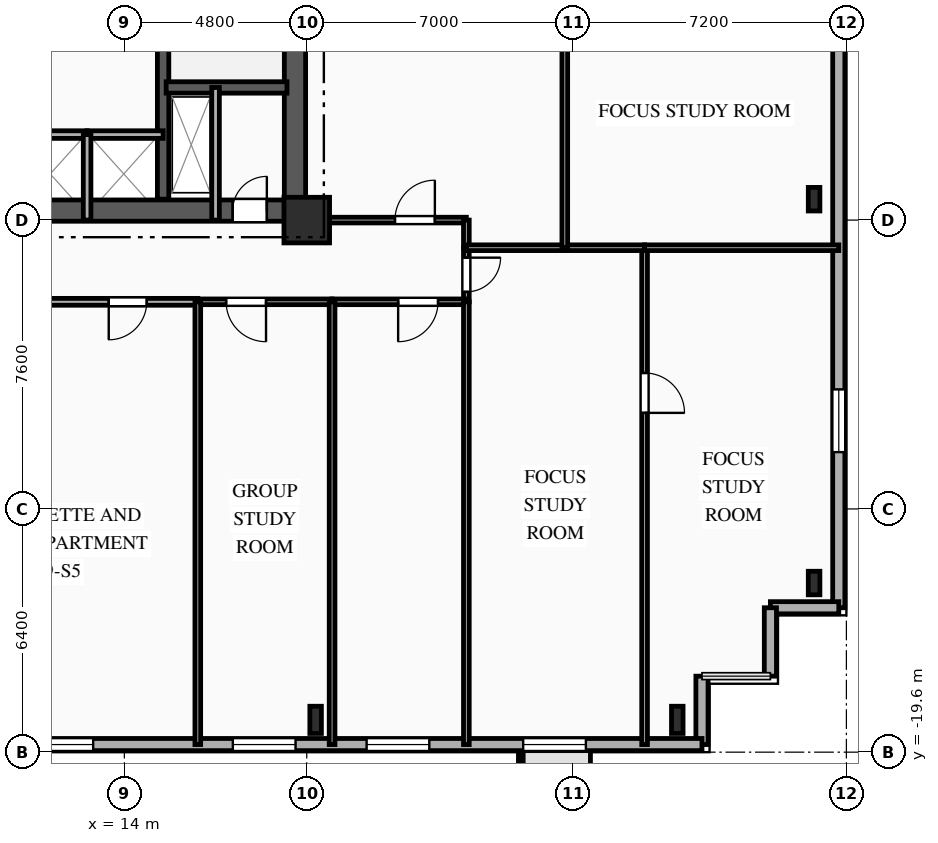
"""IFC4 building model, lengths in metres.
Left out: names, types, materials, properties, quantities, classifications, styles, units other than length and angle.
Written with IfcOpenShell. Run it as: python <this file> out.ifc"""

import sys

from ifc_helpers import new_model, si_unit, direction, frame, frame_2d, origin, origin_2d, place, context, subcontext, project, spatial, rectangle, i_section, extrude, element, fill, save


model = new_model("IFC4")
c1 = context("Model", 3, precision=1e-05, world=origin(), true_north=direction((0.0, 1.0)))
c2 = subcontext(c1, "Body", "Model", "MODEL_VIEW")
j1 = project(units=[si_unit("LENGTHUNIT", "METRE"), si_unit("PLANEANGLEUNIT", "RADIAN")], contexts=[c1])
p1 = place(None, origin())
s1 = spatial("IfcSite", under=j1, at=p1, CompositionType="ELEMENT")
p2 = place(p1, origin())
s2 = spatial("IfcBuilding", under=s1, at=p2, CompositionType="ELEMENT")
p3 = place(p2, frame((0.0, 0.0, 37.05)))
s3 = spatial("IfcBuildingStorey", under=s2, at=p3, CompositionType="ELEMENT", Elevation=37.05)
p4 = place(p3, frame((18.8, -5.6, 0.0), z_axis=(0.0, 0.0, 1.0), x_axis=(1.0, 0.0, 0.0)))
e1 = element("IfcColumn", 1, at=p4, inside=s3, PredefinedType="COLUMN", context=c2, shape_type="SweptSolid", body=[
    extrude(rectangle(XDim=1.2, YDim=1.2, at=origin_2d()), origin(), (0.0, 0.0, 1.0), 3.35),
])
for number, where, z_axis, x_axis in (
    (2, (19.033, -18.75, 0.0), (0.0, 0.0, 1.0), (1.0, 0.0, 0.0)),
    (3, (28.55, -18.75, 0.0), (0.0, 0.0, 1.0), (1.0, 0.0, 0.0)),
):
    element("IfcColumn", number, at=place(p3, frame(where, z_axis=z_axis, x_axis=x_axis)), inside=s3, PredefinedType="COLUMN", context=c2, shape_type="SweptSolid", body=[
        extrude(i_section(OverallWidth=0.304, OverallDepth=0.716, WebThickness=0.021, FlangeThickness=0.04, FilletRadius=0.027, at=origin_2d()), origin(), (0.0, 0.0, 1.0), 3.35),
    ])
for number, where, z_axis, x_axis in (
    (4, (32.15, -15.15, 0.0), (0.0, 0.0, 1.0), (1.0, 0.0, 0.0)),
    (5, (32.15, -5.05, 0.0), (0.0, 0.0, 1.0), (1.0, 0.0, 0.0)),
):
    element("IfcColumn", number, at=place(p3, frame(where, z_axis=z_axis, x_axis=x_axis)), inside=s3, PredefinedType="COLUMN", context=c2, shape_type="SweptSolid", body=[
        extrude(i_section(OverallWidth=0.305, OverallDepth=0.62, WebThickness=0.021, FlangeThickness=0.04, FilletRadius=0.027, at=origin_2d()), origin(), (0.0, 0.0, 1.0), 3.35),
    ])
p5 = place(p3, frame((32.8, 15.8, 0.0), z_axis=(0.0, 0.0, 1.0), x_axis=(0.0, -1.0, 0.0)))
e6 = element("IfcWall", 6, at=p5, inside=s3, PredefinedType="SOLIDWALL", context=c2, shape_type="SweptSolid", body=[
    extrude(rectangle(XDim=31.6, YDim=0.32, at=frame_2d((15.8, 0.0))), origin(), (0.0, 0.0, 1.0), 3.035),
])
p6 = place(p5, frame((4.175, 0.0, 0.85)))
e7 = element("IfcOpeningElement", 7, at=p6, cuts=e6, PredefinedType="OPENING", context=c2, shape_type="SweptSolid", body=[
    extrude(rectangle(XDim=1.65, YDim=1.85, at=frame_2d((0.825, 0.925))), frame((0.0, 0.17, 0.0), z_axis=(0.0, -1.0, 0.0), x_axis=(1.0, 0.0, 0.0)), (0.0, 0.0, 1.0), 0.34),
])
p7 = place(p5, frame((15.015, 0.0, 0.85)))
e8 = element("IfcOpeningElement", 8, at=p7, cuts=e6, PredefinedType="OPENING", context=c2, shape_type="SweptSolid", body=[
    extrude(rectangle(XDim=1.65, YDim=1.85, at=frame_2d((0.825, 0.925))), frame((0.0, 0.17, 0.0), z_axis=(0.0, -1.0, 0.0), x_axis=(1.0, 0.0, 0.0)), (0.0, 0.0, 1.0), 0.34),
])
p8 = place(p5, frame((25.855, 0.0, 0.85)))
e9 = element("IfcOpeningElement", 9, at=p8, cuts=e6, PredefinedType="OPENING", context=c2, shape_type="SweptSolid", body=[
    extrude(rectangle(XDim=1.65, YDim=1.85, at=frame_2d((0.825, 0.925))), frame((0.0, 0.17, 0.0), z_axis=(0.0, -1.0, 0.0), x_axis=(1.0, 0.0, 0.0)), (0.0, 0.0, 1.0), 0.34),
])
for number, where, z_axis, x_axis in (
    (10, (32.8, -15.8, 0.0), (0.0, 0.0, 1.0), (-1.0, 0.0, 0.0)),
    (11, (31.0, -15.8, 0.0), (0.0, 0.0, 1.0), (0.0, -1.0, 0.0)),
):
    element("IfcWall", number, at=place(p3, frame(where, z_axis=z_axis, x_axis=x_axis)), inside=s3, PredefinedType="SOLIDWALL", context=c2, shape_type="SweptSolid", body=[
        extrude(rectangle(XDim=1.8, YDim=0.32, at=frame_2d((0.9, 0.0))), origin(), (0.0, 0.0, 1.0), 3.035),
    ])
p9 = place(p3, frame((29.2, -17.6, 0.0), z_axis=(0.0, 0.0, 1.0), x_axis=(0.0, -1.0, 0.0)))
e12 = element("IfcWall", 12, at=p9, inside=s3, PredefinedType="SOLIDWALL", context=c2, shape_type="SweptSolid", body=[
    extrude(rectangle(XDim=1.8, YDim=0.32, at=frame_2d((0.9, 0.0))), origin(), (0.0, 0.0, 1.0), 3.035),
])
p10 = place(p3, frame((29.2, -19.4, 0.0), z_axis=(0.0, 0.0, 1.0), x_axis=(-1.0, 0.0, 0.0)))
e13 = element("IfcWall", 13, at=p10, inside=s3, PredefinedType="SOLIDWALL", context=c2, shape_type="SweptSolid", body=[
    extrude(rectangle(XDim=58.4, YDim=0.32, at=frame_2d((29.2, 0.0))), origin(), (0.0, 0.0, 1.0), 3.035),
])
p11 = place(p10, frame((3.055, 0.0, 0.85)))
e14 = element("IfcOpeningElement", 14, at=p11, cuts=e13, PredefinedType="OPENING", context=c2, shape_type="SweptSolid", body=[
    extrude(rectangle(XDim=1.65, YDim=1.85, at=frame_2d((0.825, 0.925))), frame((0.0, 0.17, 0.0), z_axis=(0.0, -1.0, 0.0), x_axis=(1.0, 0.0, 0.0)), (0.0, 0.0, 1.0), 0.34),
])
p12 = place(p10, frame((7.175, 0.0, 0.85)))
e15 = element("IfcOpeningElement", 15, at=p12, cuts=e13, PredefinedType="OPENING", context=c2, shape_type="SweptSolid", body=[
    extrude(rectangle(XDim=1.65, YDim=1.85, at=frame_2d((0.825, 0.925))), frame((0.0, 0.17, 0.0), z_axis=(0.0, -1.0, 0.0), x_axis=(1.0, 0.0, 0.0)), (0.0, 0.0, 1.0), 0.34),
])
p13 = place(p10, frame((10.695, 0.0, 0.85)))
e16 = element("IfcOpeningElement", 16, at=p13, cuts=e13, PredefinedType="OPENING", context=c2, shape_type="SweptSolid", body=[
    extrude(rectangle(XDim=1.65, YDim=1.85, at=frame_2d((0.825, 0.925))), frame((0.0, 0.17, 0.0), z_axis=(0.0, -1.0, 0.0), x_axis=(1.0, 0.0, 0.0)), (0.0, 0.0, 1.0), 0.34),
])
p14 = place(p10, frame((16.02, 0.0, 0.85)))
e17 = element("IfcOpeningElement", 17, at=p14, cuts=e13, PredefinedType="OPENING", context=c2, shape_type="SweptSolid", body=[
    extrude(rectangle(XDim=2.2, YDim=1.85, at=frame_2d((1.1, 0.925))), frame((0.0, 0.17, 0.0), z_axis=(0.0, -1.0, 0.0), x_axis=(1.0, 0.0, 0.0)), (0.0, 0.0, 1.0), 0.34),
])
p15 = place(p10, frame((23.7, 0.0, 0.85)))
e18 = element("IfcOpeningElement", 18, at=p15, cuts=e13, PredefinedType="OPENING", context=c2, shape_type="SweptSolid", body=[
    extrude(rectangle(XDim=2.2, YDim=1.85, at=frame_2d((1.1, 0.925))), frame((0.0, 0.17, 0.0), z_axis=(0.0, -1.0, 0.0), x_axis=(1.0, 0.0, 0.0)), (0.0, 0.0, 1.0), 0.34),
])
p16 = place(p10, frame((31.38, 0.0, 0.85)))
e19 = element("IfcOpeningElement", 19, at=p16, cuts=e13, PredefinedType="OPENING", context=c2, shape_type="SweptSolid", body=[
    extrude(rectangle(XDim=2.2, YDim=1.85, at=frame_2d((1.1, 0.925))), frame((0.0, 0.17, 0.0), z_axis=(0.0, -1.0, 0.0), x_axis=(1.0, 0.0, 0.0)), (0.0, 0.0, 1.0), 0.34),
])
p17 = place(p10, frame((39.06, 0.0, 0.85)))
e20 = element("IfcOpeningElement", 20, at=p17, cuts=e13, PredefinedType="OPENING", context=c2, shape_type="SweptSolid", body=[
    extrude(rectangle(XDim=2.2, YDim=1.85, at=frame_2d((1.1, 0.925))), frame((0.0, 0.17, 0.0), z_axis=(0.0, -1.0, 0.0), x_axis=(1.0, 0.0, 0.0)), (0.0, 0.0, 1.0), 0.34),
])
p18 = place(p10, frame((45.215, 0.0, 0.85)))
e21 = element("IfcOpeningElement", 21, at=p18, cuts=e13, PredefinedType="OPENING", context=c2, shape_type="SweptSolid", body=[
    extrude(rectangle(XDim=1.65, YDim=1.85, at=frame_2d((0.825, 0.925))), frame((0.0, 0.17, 0.0), z_axis=(0.0, -1.0, 0.0), x_axis=(1.0, 0.0, 0.0)), (0.0, 0.0, 1.0), 0.34),
])
p19 = place(p10, frame((49.335, 0.0, 0.85)))
e22 = element("IfcOpeningElement", 22, at=p19, cuts=e13, PredefinedType="OPENING", context=c2, shape_type="SweptSolid", body=[
    extrude(rectangle(XDim=1.65, YDim=1.85, at=frame_2d((0.825, 0.925))), frame((0.0, 0.17, 0.0), z_axis=(0.0, -1.0, 0.0), x_axis=(1.0, 0.0, 0.0)), (0.0, 0.0, 1.0), 0.34),
])
p20 = place(p3, frame((9.2, -5.35, 0.0), z_axis=(0.0, 0.0, 1.0), x_axis=(1.0, 0.0, 0.0)))
e23 = element("IfcWall", 23, at=p20, inside=s3, PredefinedType="SHEAR", context=c2, shape_type="SweptSolid", body=[
    extrude(rectangle(XDim=9.6, YDim=0.56, at=frame_2d((4.8, 0.0))), origin(), (0.0, 0.0, 1.0), 3.035),
])
p21 = place(p20, frame((7.65, 0.0, 0.0)))
e24 = element("IfcOpeningElement", 24, at=p21, cuts=e23, PredefinedType="OPENING", context=c2, shape_type="SweptSolid", body=[
    extrude(rectangle(XDim=0.9, YDim=2.1, at=frame_2d((0.45, 1.05))), frame((0.0, 0.29, 0.0), z_axis=(0.0, -1.0, 0.0), x_axis=(1.0, 0.0, 0.0)), (0.0, 0.0, 1.0), 0.58),
])
p22 = place(p3, frame((18.49, -5.05, 0.0), z_axis=(0.0, 0.0, 1.0), x_axis=(0.0, 1.0, 0.0)))
e25 = element("IfcWall", 25, at=p22, inside=s3, PredefinedType="SHEAR", context=c2, shape_type="SweptSolid", body=[
    extrude(rectangle(XDim=10.1, YDim=0.56, at=frame_2d((5.05, 0.0))), origin(), (0.0, 0.0, 1.0), 3.035),
])
p23 = place(p3, frame((15.02, -5.05, 0.0), z_axis=(0.0, 0.0, 1.0), x_axis=(0.0, 1.0, 0.0)))
e26 = element("IfcWall", 26, at=p23, inside=s3, PredefinedType="SHEAR", context=c2, shape_type="SweptSolid", body=[
    extrude(rectangle(XDim=10.1, YDim=0.3, at=frame_2d((5.05, 0.0))), origin(), (0.0, 0.0, 1.0), 3.035),
])
p24 = place(p3, frame((15.1, -2.11, 0.0), z_axis=(0.0, 0.0, 1.0), x_axis=(1.0, 0.0, 0.0)))
e27 = element("IfcWall", 27, at=p24, inside=s3, PredefinedType="SHEAR", context=c2, shape_type="SweptSolid", body=[
    extrude(rectangle(XDim=3.18, YDim=0.3, at=frame_2d((1.59, 0.0))), origin(), (0.0, 0.0, 1.0), 3.035),
])
p25 = place(p3, frame((16.4, -2.11, 0.0), z_axis=(0.0, 0.0, 1.0), x_axis=(0.0, -1.0, 0.0)))
e28 = element("IfcWall", 28, at=p25, inside=s3, PredefinedType="PARTITIONING", context=c2, shape_type="SweptSolid", body=[
    extrude(rectangle(XDim=3.49, YDim=0.2, at=frame_2d((1.745, 0.0))), origin(), (0.0, 0.0, 1.0), 3.035),
])
p26 = place(p3, frame((11.08, -3.35, 0.0), z_axis=(0.0, 0.0, 1.0), x_axis=(1.0, 0.0, 0.0)))
e29 = element("IfcWall", 29, at=p26, inside=s3, PredefinedType="PARTITIONING", context=c2, shape_type="SweptSolid", body=[
    extrude(rectangle(XDim=1.94, YDim=0.2, at=frame_2d((0.97, 0.0))), origin(), (0.0, 0.0, 1.0), 3.035),
])
p27 = place(p3, frame((13.02, -3.35, 0.0), z_axis=(0.0, 0.0, 1.0), x_axis=(1.0, 0.0, 0.0)))
e30 = element("IfcWall", 30, at=p27, inside=s3, PredefinedType="PARTITIONING", context=c2, shape_type="SweptSolid", body=[
    extrude(rectangle(XDim=2.0, YDim=0.2, at=frame_2d((1.0, 0.0))), origin(), (0.0, 0.0, 1.0), 3.035),
])
p28 = place(p3, frame((13.02, -5.6, 0.0), z_axis=(0.0, 0.0, 1.0), x_axis=(0.0, 1.0, 0.0)))
e31 = element("IfcWall", 31, at=p28, inside=s3, PredefinedType="PARTITIONING", context=c2, shape_type="SweptSolid", body=[
    extrude(rectangle(XDim=2.25, YDim=0.2, at=frame_2d((1.125, 0.0))), origin(), (0.0, 0.0, 1.0), 3.035),
])
p29 = place(p3, frame((23.0, -6.327, 0.0), z_axis=(0.0, 0.0, 1.0), x_axis=(0.0, -1.0, 0.0)))
e32 = element("IfcWall", 32, at=p29, inside=s3, PredefinedType="PARTITIONING", context=c2, shape_type="SweptSolid", body=[
    extrude(rectangle(XDim=1.423, YDim=0.15, at=frame_2d((0.711, 0.0))), origin(), (0.0, 0.0, 1.0), 3.035),
])
p30 = place(p29, frame((0.261, 0.0, 0.0)))
e33 = element("IfcOpeningElement", 33, at=p30, cuts=e32, PredefinedType="OPENING", context=c2, shape_type="SweptSolid", body=[
    extrude(rectangle(XDim=0.9, YDim=2.1, at=frame_2d((0.45, 1.05))), frame((0.0, 0.085, 0.0), z_axis=(0.0, -1.0, 0.0), x_axis=(1.0, 0.0, 0.0)), (0.0, 0.0, 1.0), 0.17),
])
p31 = place(p3, frame((18.8, -5.6, 0.0), z_axis=(0.0, 0.0, 1.0), x_axis=(1.0, 0.0, 0.0)))
e34 = element("IfcWall", 34, at=p31, inside=s3, PredefinedType="PARTITIONING", context=c2, shape_type="SweptSolid", body=[
    extrude(rectangle(XDim=4.2, YDim=0.15, at=frame_2d((2.1, 0.0))), origin(), (0.0, 0.0, 1.0), 3.035),
])
p32 = place(p31, frame((2.321, 0.0, 0.0)))
e35 = element("IfcOpeningElement", 35, at=p32, cuts=e34, PredefinedType="OPENING", context=c2, shape_type="SweptSolid", body=[
    extrude(rectangle(XDim=1.05, YDim=2.15, at=frame_2d((0.525, 1.075))), frame((0.0, 0.085, 0.0), z_axis=(0.0, -1.0, 0.0), x_axis=(1.0, 0.0, 0.0)), (0.0, 0.0, 1.0), 0.17),
])
p33 = place(p3, frame((23.0, -5.6, 0.0), z_axis=(0.0, 0.0, 1.0), x_axis=(0.0, -1.0, 0.0)))
e36 = element("IfcWall", 36, at=p33, inside=s3, PredefinedType="PARTITIONING", context=c2, shape_type="SweptSolid", body=[
    extrude(rectangle(XDim=0.727, YDim=0.15, at=frame_2d((0.363, 0.0))), origin(), (0.0, 0.0, 1.0), 3.035),
])
p34 = place(p3, frame((15.933, -7.75, 0.0), z_axis=(0.0, 0.0, 1.0), x_axis=(-1.0, 0.0, 0.0)))
e37 = element("IfcWall", 37, at=p34, inside=s3, PredefinedType="PARTITIONING", context=c2, shape_type="SweptSolid", body=[
    extrude(rectangle(XDim=5.216, YDim=0.18, at=frame_2d((2.608, 0.0))), origin(), (0.0, 0.0, 1.0), 3.035),
])
p35 = place(p34, frame((1.344, 0.0, 0.0)))
e38 = element("IfcOpeningElement", 38, at=p35, cuts=e37, PredefinedType="OPENING", context=c2, shape_type="SweptSolid", body=[
    extrude(rectangle(XDim=1.0, YDim=2.15, at=frame_2d((0.5, 1.075))), frame((0.0, 0.1, 0.0), z_axis=(0.0, -1.0, 0.0), x_axis=(1.0, 0.0, 0.0)), (0.0, 0.0, 1.0), 0.2),
])
p36 = place(p3, frame((19.467, -7.75, 0.0), z_axis=(0.0, 0.0, 1.0), x_axis=(-1.0, 0.0, 0.0)))
e39 = element("IfcWall", 39, at=p36, inside=s3, PredefinedType="PARTITIONING", context=c2, shape_type="SweptSolid", body=[
    extrude(rectangle(XDim=3.533, YDim=0.15, at=frame_2d((1.767, 0.0))), origin(), (0.0, 0.0, 1.0), 3.035),
])
p37 = place(p36, frame((1.738, 0.0, 0.0)))
e40 = element("IfcOpeningElement", 40, at=p37, cuts=e39, PredefinedType="OPENING", context=c2, shape_type="SweptSolid", body=[
    extrude(rectangle(XDim=1.05, YDim=2.15, at=frame_2d((0.525, 1.075))), frame((0.0, 0.085, 0.0), z_axis=(0.0, -1.0, 0.0), x_axis=(1.0, 0.0, 0.0)), (0.0, 0.0, 1.0), 0.17),
])
p38 = place(p3, frame((23.0, -7.75, 0.0), z_axis=(0.0, 0.0, 1.0), x_axis=(-1.0, 0.0, 0.0)))
e41 = element("IfcWall", 41, at=p38, inside=s3, PredefinedType="PARTITIONING", context=c2, shape_type="SweptSolid", body=[
    extrude(rectangle(XDim=3.533, YDim=0.15, at=frame_2d((1.767, 0.0))), origin(), (0.0, 0.0, 1.0), 3.035),
])
p39 = place(p38, frame((0.745, 0.0, 0.0)))
e42 = element("IfcOpeningElement", 42, at=p39, cuts=e41, PredefinedType="OPENING", context=c2, shape_type="SweptSolid", body=[
    extrude(rectangle(XDim=1.05, YDim=2.15, at=frame_2d((0.525, 1.075))), frame((0.0, 0.085, 0.0), z_axis=(0.0, -1.0, 0.0), x_axis=(1.0, 0.0, 0.0)), (0.0, 0.0, 1.0), 0.17),
])
p40 = place(p3, frame((27.69, -6.327, 0.0), z_axis=(0.0, 0.0, 1.0), x_axis=(0.0, -1.0, 0.0)))
e43 = element("IfcWall", 43, at=p40, inside=s3, PredefinedType="PARTITIONING", context=c2, shape_type="SweptSolid", body=[
    extrude(rectangle(XDim=13.073, YDim=0.15, at=frame_2d((6.537, 0.0))), origin(), (0.0, 0.0, 1.0), 3.035),
])
p41 = place(p40, frame((3.296, 0.0, 0.0)))
e44 = element("IfcOpeningElement", 44, at=p41, cuts=e43, PredefinedType="OPENING", context=c2, shape_type="SweptSolid", body=[
    extrude(rectangle(XDim=1.05, YDim=2.15, at=frame_2d((0.525, 1.075))), frame((0.0, 0.085, 0.0), z_axis=(0.0, -1.0, 0.0), x_axis=(1.0, 0.0, 0.0)), (0.0, 0.0, 1.0), 0.17),
])
p42 = place(p3, frame((23.0, -6.327, 0.0), z_axis=(0.0, 0.0, 1.0), x_axis=(1.0, 0.0, 0.0)))
e45 = element("IfcWall", 45, at=p42, inside=s3, PredefinedType="PARTITIONING", context=c2, shape_type="SweptSolid", body=[
    extrude(rectangle(XDim=2.59, YDim=0.15, at=frame_2d((1.295, 0.0))), origin(), (0.0, 0.0, 1.0), 3.035),
])
p43 = place(p3, frame((25.59, -6.327, 0.0), z_axis=(0.0, 0.0, 1.0), x_axis=(1.0, 0.0, 0.0)))
e46 = element("IfcWall", 46, at=p43, inside=s3, PredefinedType="PARTITIONING", context=c2, shape_type="SweptSolid", body=[
    extrude(rectangle(XDim=2.1, YDim=0.15, at=frame_2d((1.05, 0.0))), origin(), (0.0, 0.0, 1.0), 3.035),
])
p44 = place(p3, frame((23.0, -19.4, 0.0), z_axis=(0.0, 0.0, 1.0), x_axis=(0.0, 1.0, 0.0)))
e47 = element("IfcWall", 47, at=p44, inside=s3, PredefinedType="PARTITIONING", context=c2, shape_type="SweptSolid", body=[
    extrude(rectangle(XDim=11.65, YDim=0.15, at=frame_2d((5.825, 0.0))), origin(), (0.0, 0.0, 1.0), 3.035),
])
p45 = place(p3, frame((27.69, -6.327, 0.0), z_axis=(0.0, 0.0, 1.0), x_axis=(1.0, 0.0, 0.0)))
e48 = element("IfcWall", 48, at=p45, inside=s3, PredefinedType="PARTITIONING", context=c2, shape_type="SweptSolid", body=[
    extrude(rectangle(XDim=5.11, YDim=0.15, at=frame_2d((2.555, 0.0))), origin(), (0.0, 0.0, 1.0), 3.035),
])
p46 = place(p3, frame((25.59, 6.327, 0.0), z_axis=(0.0, 0.0, 1.0), x_axis=(0.0, -1.0, 0.0)))
e49 = element("IfcWall", 49, at=p46, inside=s3, PredefinedType="PARTITIONING", context=c2, shape_type="SweptSolid", body=[
    extrude(rectangle(XDim=12.654, YDim=0.15, at=frame_2d((6.327, 0.0))), origin(), (0.0, 0.0, 1.0), 2.69),
])
p47 = place(p46, frame((5.802, 0.0, 0.0)))
e50 = element("IfcOpeningElement", 50, at=p47, cuts=e49, PredefinedType="OPENING", context=c2, shape_type="SweptSolid", body=[
    extrude(rectangle(XDim=1.05, YDim=2.15, at=frame_2d((0.525, 1.075))), frame((0.0, 0.085, 0.0), z_axis=(0.0, -1.0, 0.0), x_axis=(1.0, 0.0, 0.0)), (0.0, 0.0, 1.0), 0.17),
])
for number, where, z_axis, x_axis in (
    (51, (15.933, -7.75, 0.0), (0.0, 0.0, 1.0), (0.0, -1.0, 0.0)),
    (52, (19.467, -7.75, 0.0), (0.0, 0.0, 1.0), (0.0, -1.0, 0.0)),
):
    element("IfcWall", number, at=place(p3, frame(where, z_axis=z_axis, x_axis=x_axis)), inside=s3, PredefinedType="PARTITIONING", context=c2, shape_type="SweptSolid", body=[
        extrude(rectangle(XDim=11.65, YDim=0.15, at=frame_2d((5.825, 0.0))), origin(), (0.0, 0.0, 1.0), 3.035),
    ])
p48 = place(p8, origin())
e53 = element("IfcWindow", 53, at=p48, inside=s3, PartitioningType="SINGLE_PANEL", PredefinedType="WINDOW", context=c2, shape_type="SweptSolid", body=[
    extrude(rectangle(XDim=1.65, YDim=1.85, at=frame_2d((0.825, 0.925))), frame((0.0, 0.03, 0.0), z_axis=(0.0, -1.0, 0.0), x_axis=(1.0, 0.0, 0.0)), (0.0, 0.0, 1.0), 0.06),
])
fill(e9, e53)
p49 = place(p11, origin())
e54 = element("IfcWindow", 54, at=p49, inside=s3, PartitioningType="SINGLE_PANEL", PredefinedType="WINDOW", context=c2, shape_type="SweptSolid", body=[
    extrude(rectangle(XDim=1.65, YDim=1.85, at=frame_2d((0.825, 0.925))), frame((0.0, 0.03, 0.0), z_axis=(0.0, -1.0, 0.0), x_axis=(1.0, 0.0, 0.0)), (0.0, 0.0, 1.0), 0.06),
])
fill(e14, e54)
p50 = place(p12, origin())
e55 = element("IfcWindow", 55, at=p50, inside=s3, PartitioningType="SINGLE_PANEL", PredefinedType="WINDOW", context=c2, shape_type="SweptSolid", body=[
    extrude(rectangle(XDim=1.65, YDim=1.85, at=frame_2d((0.825, 0.925))), frame((0.0, 0.03, 0.0), z_axis=(0.0, -1.0, 0.0), x_axis=(1.0, 0.0, 0.0)), (0.0, 0.0, 1.0), 0.06),
])
fill(e15, e55)
p51 = place(p13, origin())
e56 = element("IfcWindow", 56, at=p51, inside=s3, PartitioningType="SINGLE_PANEL", PredefinedType="WINDOW", context=c2, shape_type="SweptSolid", body=[
    extrude(rectangle(XDim=1.65, YDim=1.85, at=frame_2d((0.825, 0.925))), frame((0.0, 0.03, 0.0), z_axis=(0.0, -1.0, 0.0), x_axis=(1.0, 0.0, 0.0)), (0.0, 0.0, 1.0), 0.06),
])
fill(e16, e56)
p52 = place(p14, origin())
e57 = element("IfcWindow", 57, at=p52, inside=s3, PartitioningType="SINGLE_PANEL", PredefinedType="WINDOW", context=c2, shape_type="SweptSolid", body=[
    extrude(rectangle(XDim=2.2, YDim=1.85, at=frame_2d((1.1, 0.925))), frame((0.0, 0.03, 0.0), z_axis=(0.0, -1.0, 0.0), x_axis=(1.0, 0.0, 0.0)), (0.0, 0.0, 1.0), 0.06),
])
fill(e17, e57)
p53 = place(p21, origin())
e58 = element("IfcDoor", 58, at=p53, inside=s3, OperationType="SINGLE_SWING_RIGHT", PredefinedType="DOOR", context=c2, shape_type="SweptSolid", body=[
    extrude(rectangle(XDim=0.9, YDim=2.1, at=frame_2d((0.45, 1.05))), frame((0.0, 0.025, 0.0), z_axis=(0.0, -1.0, 0.0), x_axis=(1.0, 0.0, 0.0)), (0.0, 0.0, 1.0), 0.05),
])
fill(e24, e58)
p54 = place(p30, origin())
e59 = element("IfcDoor", 59, at=p54, inside=s3, OperationType="SINGLE_SWING_LEFT", PredefinedType="DOOR", context=c2, shape_type="SweptSolid", body=[
    extrude(rectangle(XDim=0.9, YDim=2.1, at=frame_2d((0.45, 1.05))), frame((0.0, 0.025, 0.0), z_axis=(0.0, -1.0, 0.0), x_axis=(1.0, 0.0, 0.0)), (0.0, 0.0, 1.0), 0.05),
])
fill(e33, e59)
p55 = place(p32, origin())
e60 = element("IfcDoor", 60, at=p55, inside=s3, OperationType="SINGLE_SWING_RIGHT", PredefinedType="DOOR", context=c2, shape_type="SweptSolid", body=[
    extrude(rectangle(XDim=1.05, YDim=2.15, at=frame_2d((0.525, 1.075))), frame((0.0, 0.025, 0.0), z_axis=(0.0, -1.0, 0.0), x_axis=(1.0, 0.0, 0.0)), (0.0, 0.0, 1.0), 0.05),
])
fill(e35, e60)
p56 = place(p35, origin())
e61 = element("IfcDoor", 61, at=p56, inside=s3, OperationType="SINGLE_SWING_RIGHT", PredefinedType="DOOR", context=c2, shape_type="SweptSolid", body=[
    extrude(rectangle(XDim=1.0, YDim=2.15, at=frame_2d((0.5, 1.075))), frame((0.0, 0.025, 0.0), z_axis=(0.0, -1.0, 0.0), x_axis=(1.0, 0.0, 0.0)), (0.0, 0.0, 1.0), 0.05),
])
fill(e38, e61)
p57 = place(p37, origin())
e62 = element("IfcDoor", 62, at=p57, inside=s3, OperationType="SINGLE_SWING_LEFT", PredefinedType="DOOR", context=c2, shape_type="SweptSolid", body=[
    extrude(rectangle(XDim=1.05, YDim=2.15, at=frame_2d((0.525, 1.075))), frame((0.0, 0.025, 0.0), z_axis=(0.0, -1.0, 0.0), x_axis=(1.0, 0.0, 0.0)), (0.0, 0.0, 1.0), 0.05),
])
fill(e40, e62)
p58 = place(p39, origin())
e63 = element("IfcDoor", 63, at=p58, inside=s3, OperationType="SINGLE_SWING_RIGHT", PredefinedType="DOOR", context=c2, shape_type="SweptSolid", body=[
    extrude(rectangle(XDim=1.05, YDim=2.15, at=frame_2d((0.525, 1.075))), frame((0.0, 0.025, 0.0), z_axis=(0.0, -1.0, 0.0), x_axis=(1.0, 0.0, 0.0)), (0.0, 0.0, 1.0), 0.05),
])
fill(e42, e63)
p59 = place(p41, origin())
e64 = element("IfcDoor", 64, at=p59, inside=s3, OperationType="SINGLE_SWING_RIGHT", PredefinedType="DOOR", context=c2, shape_type="SweptSolid", body=[
    extrude(rectangle(XDim=1.05, YDim=2.15, at=frame_2d((0.525, 1.075))), frame((0.0, 0.025, 0.0), z_axis=(0.0, -1.0, 0.0), x_axis=(1.0, 0.0, 0.0)), (0.0, 0.0, 1.0), 0.05),
])
fill(e44, e64)
save(model, sys.argv[1])
